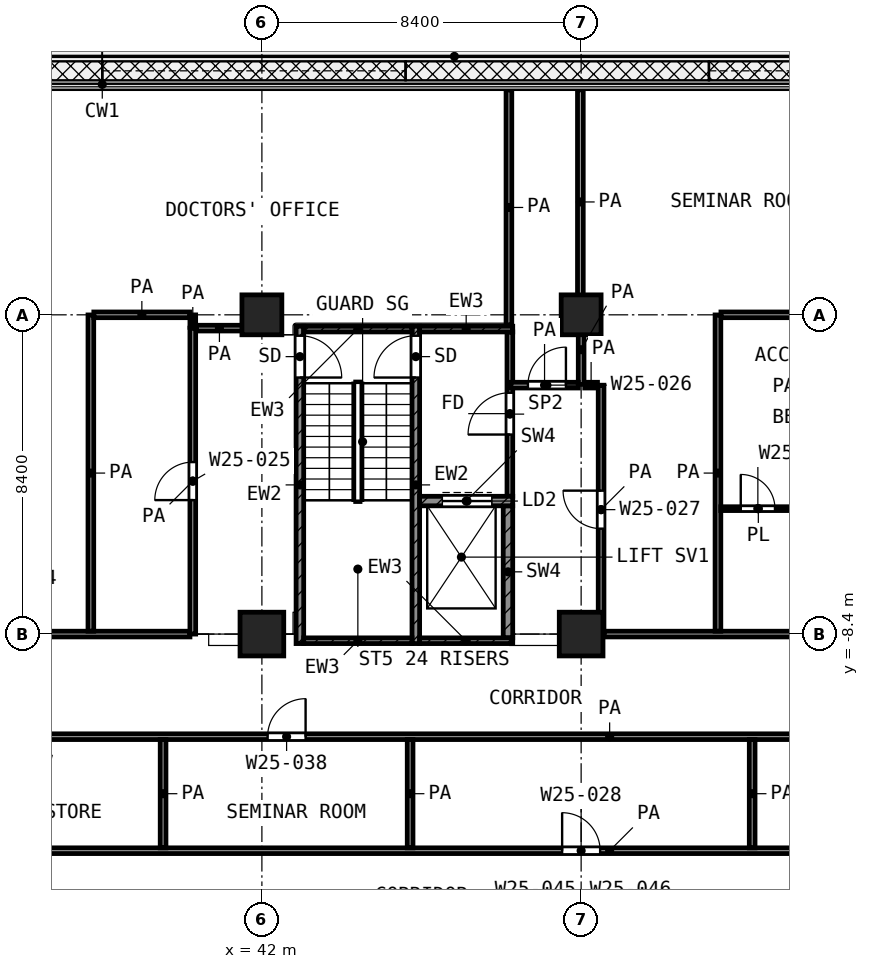
"""IFC4 building model, lengths in metres.
Left out: names, types, materials, properties, quantities, classifications, styles, units other than length and angle.
Written with IfcOpenShell. Run it as: python <this file> out.ifc"""

import sys

from ifc_helpers import new_model, si_unit, direction, frame, frame_2d, origin, origin_2d, place, context, subcontext, project, spatial, rectangle, extrude, element, fill, save


model = new_model("IFC4")
c1 = context("Model", 3, precision=1e-05, world=origin(), true_north=direction((0.0, 1.0)))
c2 = subcontext(c1, "Body", "Model", "MODEL_VIEW")
j1 = project(units=[si_unit("LENGTHUNIT", "METRE"), si_unit("PLANEANGLEUNIT", "RADIAN")], contexts=[c1])
p1 = place(None, origin())
s1 = spatial("IfcSite", under=j1, at=p1, CompositionType="ELEMENT")
p2 = place(p1, origin())
s2 = spatial("IfcBuilding", under=s1, at=p2, CompositionType="ELEMENT")
p3 = place(p2, frame((0.0, 0.0, 132.4)))
s3 = spatial("IfcBuildingStorey", under=s2, at=p3, CompositionType="ELEMENT", Elevation=132.4)
for number, where, z_axis, x_axis in (
    (1, (42.0, 0.0, 0.0), (0.0, 0.0, 1.0), (1.0, 0.0, 0.0)),
    (2, (50.4, 0.0, 0.0), (0.0, 0.0, 1.0), (1.0, 0.0, 0.0)),
):
    element("IfcColumn", number, at=place(p3, frame(where, z_axis=z_axis, x_axis=x_axis)), inside=s3, PredefinedType="COLUMN", context=c2, shape_type="SweptSolid", body=[
        extrude(rectangle(XDim=1.05, YDim=1.05, at=origin_2d()), origin(), (0.0, 0.0, 1.0), 4.2),
    ])
for number, where, z_axis, x_axis in (
    (3, (42.0, -8.4, 0.0), (0.0, 0.0, 1.0), (1.0, 0.0, 0.0)),
    (4, (50.4, -8.4, 0.0), (0.0, 0.0, 1.0), (1.0, 0.0, 0.0)),
):
    element("IfcColumn", number, at=place(p3, frame(where, z_axis=z_axis, x_axis=x_axis)), inside=s3, PredefinedType="COLUMN", context=c2, shape_type="SweptSolid", body=[
        extrude(rectangle(XDim=1.15, YDim=1.15, at=origin_2d()), origin(), (0.0, 0.0, 1.0), 4.2),
    ])
p4 = place(p3, frame((43.0, -8.65, 0.0), z_axis=(0.0, 0.0, 1.0), x_axis=(0.0, 1.0, 0.0)))
e5 = element("IfcWall", 5, at=p4, inside=s3, PredefinedType="SHEAR", context=c2, shape_type="SweptSolid", body=[
    extrude(rectangle(XDim=8.35, YDim=0.2, at=frame_2d((4.175, 0.0))), origin(), (0.0, 0.0, 1.0), 3.6),
])
p5 = place(p4, frame((7.0, 0.0, 0.0)))
e6 = element("IfcOpeningElement", 6, at=p5, cuts=e5, PredefinedType="OPENING", context=c2, shape_type="SweptSolid", body=[
    extrude(rectangle(XDim=1.1, YDim=2.1, at=frame_2d((0.55, 1.05))), frame((0.0, 0.11, 0.0), z_axis=(0.0, -1.0, 0.0), x_axis=(1.0, 0.0, 0.0)), (0.0, 0.0, 1.0), 0.22),
])
p6 = place(p3, frame((46.05, -8.65, 0.0), z_axis=(0.0, 0.0, 1.0), x_axis=(0.0, 1.0, 0.0)))
e7 = element("IfcWall", 7, at=p6, inside=s3, PredefinedType="SHEAR", context=c2, shape_type="SweptSolid", body=[
    extrude(rectangle(XDim=8.35, YDim=0.2, at=frame_2d((4.175, 0.0))), origin(), (0.0, 0.0, 1.0), 3.6),
])
p7 = place(p6, frame((7.0, 0.0, 0.0)))
e8 = element("IfcOpeningElement", 8, at=p7, cuts=e7, PredefinedType="OPENING", context=c2, shape_type="SweptSolid", body=[
    extrude(rectangle(XDim=1.1, YDim=2.1, at=frame_2d((0.55, 1.05))), frame((0.0, 0.11, 0.0), z_axis=(0.0, -1.0, 0.0), x_axis=(1.0, 0.0, 0.0)), (0.0, 0.0, 1.0), 0.22),
])
p8 = place(p3, frame((43.1, -0.375, 0.0), z_axis=(0.0, 0.0, 1.0), x_axis=(1.0, 0.0, 0.0)))
e9 = element("IfcWall", 9, at=p8, inside=s3, PredefinedType="SHEAR", context=c2, shape_type="SweptSolid", body=[
    extrude(rectangle(XDim=2.85, YDim=0.15, at=frame_2d((1.425, 0.0))), origin(), (0.0, 0.0, 1.0), 3.6),
])
p9 = place(p3, frame((46.15, -0.375, 0.0), z_axis=(0.0, 0.0, 1.0), x_axis=(1.0, 0.0, 0.0)))
e10 = element("IfcWall", 10, at=p9, inside=s3, PredefinedType="SHEAR", context=c2, shape_type="SweptSolid", body=[
    extrude(rectangle(XDim=2.45, YDim=0.15, at=frame_2d((1.225, 0.0))), origin(), (0.0, 0.0, 1.0), 3.6),
])
p10 = place(p3, frame((43.1, -8.575, 0.0), z_axis=(0.0, 0.0, 1.0), x_axis=(1.0, 0.0, 0.0)))
e11 = element("IfcWall", 11, at=p10, inside=s3, PredefinedType="SHEAR", context=c2, shape_type="SweptSolid", body=[
    extrude(rectangle(XDim=2.85, YDim=0.15, at=frame_2d((1.425, 0.0))), origin(), (0.0, 0.0, 1.0), 3.6),
])
p11 = place(p3, frame((46.15, -8.575, 0.0), z_axis=(0.0, 0.0, 1.0), x_axis=(1.0, 0.0, 0.0)))
e12 = element("IfcWall", 12, at=p11, inside=s3, PredefinedType="SHEAR", context=c2, shape_type="SweptSolid", body=[
    extrude(rectangle(XDim=2.45, YDim=0.15, at=frame_2d((1.225, 0.0))), origin(), (0.0, 0.0, 1.0), 3.6),
])
p12 = place(p3, frame((46.15, -4.9, 0.0), z_axis=(0.0, 0.0, 1.0), x_axis=(1.0, 0.0, 0.0)))
e13 = element("IfcWall", 13, at=p12, inside=s3, PredefinedType="SHEAR", context=c2, shape_type="SweptSolid", body=[
    extrude(rectangle(XDim=2.45, YDim=0.25, at=frame_2d((1.225, 0.0))), origin(), (0.0, 0.0, 1.0), 3.6),
])
p13 = place(p12, frame((0.6, 0.0, 0.0)))
e14 = element("IfcOpeningElement", 14, at=p13, cuts=e13, PredefinedType="OPENING", context=c2, shape_type="SweptSolid", body=[
    extrude(rectangle(XDim=1.3, YDim=2.1, at=frame_2d((0.65, 1.05))), frame((0.0, 0.135, 0.0), z_axis=(0.0, -1.0, 0.0), x_axis=(1.0, 0.0, 0.0)), (0.0, 0.0, 1.0), 0.27),
])
p14 = place(p3, frame((48.475, -8.5, 0.0), z_axis=(0.0, 0.0, 1.0), x_axis=(0.0, 1.0, 0.0)))
e15 = element("IfcWall", 15, at=p14, inside=s3, PredefinedType="SHEAR", context=c2, shape_type="SweptSolid", body=[
    extrude(rectangle(XDim=3.475, YDim=0.25, at=frame_2d((1.738, 0.0))), origin(), (0.0, 0.0, 1.0), 3.6),
])
p15 = place(p3, frame((48.525, -4.775, 0.0), z_axis=(0.0, 0.0, 1.0), x_axis=(0.0, 1.0, 0.0)))
e16 = element("IfcWall", 16, at=p15, inside=s3, PredefinedType="PARTITIONING", context=c2, shape_type="SweptSolid", body=[
    extrude(rectangle(XDim=4.325, YDim=0.15, at=frame_2d((2.163, 0.0))), origin(), (0.0, 0.0, 1.0), 3.6),
])
p16 = place(p15, frame((1.625, 0.0, 0.0)))
e17 = element("IfcOpeningElement", 17, at=p16, cuts=e16, PredefinedType="OPENING", context=c2, shape_type="SweptSolid", body=[
    extrude(rectangle(XDim=1.1, YDim=2.1, at=frame_2d((0.55, 1.05))), frame((0.0, 0.085, 0.0), z_axis=(0.0, -1.0, 0.0), x_axis=(1.0, 0.0, 0.0)), (0.0, 0.0, 1.0), 0.17),
])
p17 = place(p3, frame((54.075, -5.1, 0.0), z_axis=(0.0, 0.0, 1.0), x_axis=(1.0, 0.0, 0.0)))
e18 = element("IfcWall", 18, at=p17, inside=s3, PredefinedType="PARTITIONING", context=c2, shape_type="SweptSolid", body=[
    extrude(rectangle(XDim=1.975, YDim=0.1, at=frame_2d((0.988, 0.0))), origin(), (0.0, 0.0, 1.0), 3.6),
])
p18 = place(p17, frame((0.525, 0.0, 0.0)))
e19 = element("IfcOpeningElement", 19, at=p18, cuts=e18, PredefinedType="OPENING", context=c2, shape_type="SweptSolid", body=[
    extrude(rectangle(XDim=0.9, YDim=2.1, at=frame_2d((0.45, 1.05))), frame((0.0, 0.06, 0.0), z_axis=(0.0, -1.0, 0.0), x_axis=(1.0, 0.0, 0.0)), (0.0, 0.0, 1.0), 0.12),
])
p19 = place(p3, frame((29.475, -14.1, 0.0), z_axis=(0.0, 0.0, 1.0), x_axis=(1.0, 0.0, 0.0)))
e20 = element("IfcWall", 20, at=p19, inside=s3, PredefinedType="PARTITIONING", context=c2, shape_type="SweptSolid", body=[
    extrude(rectangle(XDim=43.35, YDim=0.15, at=frame_2d((21.675, 0.0))), origin(), (0.0, 0.0, 1.0), 3.6),
])
p20 = place(p19, frame((20.425, 0.0, 0.0)))
e21 = element("IfcOpeningElement", 21, at=p20, cuts=e20, PredefinedType="OPENING", context=c2, shape_type="SweptSolid", body=[
    extrude(rectangle(XDim=1.0, YDim=2.1, at=frame_2d((0.5, 1.05))), frame((0.0, 0.085, 0.0), z_axis=(0.0, -1.0, 0.0), x_axis=(1.0, 0.0, 0.0)), (0.0, 0.0, 1.0), 0.17),
])
p21 = place(p3, frame((29.475, -11.1, 0.0), z_axis=(0.0, 0.0, 1.0), x_axis=(1.0, 0.0, 0.0)))
e22 = element("IfcWall", 22, at=p21, inside=s3, PredefinedType="PARTITIONING", context=c2, shape_type="SweptSolid", body=[
    extrude(rectangle(XDim=43.35, YDim=0.15, at=frame_2d((21.675, 0.0))), origin(), (0.0, 0.0, 1.0), 3.6),
])
p22 = place(p21, frame((28.675, 0.0, 0.0)))
e23 = element("IfcOpeningElement", 23, at=p22, cuts=e22, PredefinedType="OPENING", context=c2, shape_type="SweptSolid", body=[
    extrude(rectangle(XDim=1.0, YDim=2.1, at=frame_2d((0.5, 1.05))), frame((0.0, 0.085, 0.0), z_axis=(0.0, -1.0, 0.0), x_axis=(1.0, 0.0, 0.0)), (0.0, 0.0, 1.0), 0.17),
])
p23 = place(p21, frame((34.875, 0.0, 0.0)))
e24 = element("IfcOpeningElement", 24, at=p23, cuts=e22, PredefinedType="OPENING", context=c2, shape_type="SweptSolid", body=[
    extrude(rectangle(XDim=0.9, YDim=2.1, at=frame_2d((0.45, 1.05))), frame((0.0, 0.085, 0.0), z_axis=(0.0, -1.0, 0.0), x_axis=(1.0, 0.0, 0.0)), (0.0, 0.0, 1.0), 0.17),
])
p24 = place(p21, frame((40.075, 0.0, 0.0)))
e25 = element("IfcOpeningElement", 25, at=p24, cuts=e22, PredefinedType="OPENING", context=c2, shape_type="SweptSolid", body=[
    extrude(rectangle(XDim=1.0, YDim=2.1, at=frame_2d((0.5, 1.05))), frame((0.0, 0.085, 0.0), z_axis=(0.0, -1.0, 0.0), x_axis=(1.0, 0.0, 0.0)), (0.0, 0.0, 1.0), 0.17),
])
p25 = place(p21, frame((5.475, 0.0, 0.0)))
e26 = element("IfcOpeningElement", 26, at=p25, cuts=e22, PredefinedType="OPENING", context=c2, shape_type="SweptSolid", body=[
    extrude(rectangle(XDim=1.0, YDim=2.1, at=frame_2d((0.5, 1.05))), frame((0.0, 0.085, 0.0), z_axis=(0.0, -1.0, 0.0), x_axis=(1.0, 0.0, 0.0)), (0.0, 0.0, 1.0), 0.17),
])
p26 = place(p21, frame((12.675, 0.0, 0.0)))
e27 = element("IfcOpeningElement", 27, at=p26, cuts=e22, PredefinedType="OPENING", context=c2, shape_type="SweptSolid", body=[
    extrude(rectangle(XDim=1.0, YDim=2.1, at=frame_2d((0.5, 1.05))), frame((0.0, 0.085, 0.0), z_axis=(0.0, -1.0, 0.0), x_axis=(1.0, 0.0, 0.0)), (0.0, 0.0, 1.0), 0.17),
])
p27 = place(p3, frame((25.0, -8.4, 0.0), z_axis=(0.0, 0.0, 1.0), x_axis=(1.0, 0.0, 0.0)))
e28 = element("IfcWall", 28, at=p27, inside=s3, PredefinedType="PARTITIONING", context=c2, shape_type="SweptSolid", body=[
    extrude(rectangle(XDim=15.107, YDim=0.15, at=frame_2d((7.553, 0.0))), origin(), (0.0, 0.0, 1.0), 3.6),
])
p28 = place(p27, frame((3.8, 0.0, 0.0)))
e29 = element("IfcOpeningElement", 29, at=p28, cuts=e28, PredefinedType="OPENING", context=c2, shape_type="SweptSolid", body=[
    extrude(rectangle(XDim=1.2, YDim=2.1, at=frame_2d((0.6, 1.05))), frame((0.0, 0.085, 0.0), z_axis=(0.0, -1.0, 0.0), x_axis=(1.0, 0.0, 0.0)), (0.0, 0.0, 1.0), 0.17),
])
p29 = place(p27, frame((10.05, 0.0, 0.0)))
e30 = element("IfcOpeningElement", 30, at=p29, cuts=e28, PredefinedType="OPENING", context=c2, shape_type="SweptSolid", body=[
    extrude(rectangle(XDim=1.0, YDim=2.1, at=frame_2d((0.5, 1.05))), frame((0.0, 0.085, 0.0), z_axis=(0.0, -1.0, 0.0), x_axis=(1.0, 0.0, 0.0)), (0.0, 0.0, 1.0), 0.17),
])
p30 = place(p3, frame((51.0, -8.4, 0.0), z_axis=(0.0, 0.0, 1.0), x_axis=(1.0, 0.0, 0.0)))
e31 = element("IfcWall", 31, at=p30, inside=s3, PredefinedType="PARTITIONING", context=c2, shape_type="SweptSolid", body=[
    extrude(rectangle(XDim=24.52, YDim=0.15, at=frame_2d((12.26, 0.0))), origin(), (0.0, 0.0, 1.0), 3.6),
])
p31 = place(p30, frame((5.4, 0.0, 0.0)))
e32 = element("IfcOpeningElement", 32, at=p31, cuts=e31, PredefinedType="OPENING", context=c2, shape_type="SweptSolid", body=[
    extrude(rectangle(XDim=1.2, YDim=2.1, at=frame_2d((0.6, 1.05))), frame((0.0, 0.085, 0.0), z_axis=(0.0, -1.0, 0.0), x_axis=(1.0, 0.0, 0.0)), (0.0, 0.0, 1.0), 0.17),
])
p32 = place(p30, frame((8.4, 0.0, 0.0)))
e33 = element("IfcOpeningElement", 33, at=p32, cuts=e31, PredefinedType="OPENING", context=c2, shape_type="SweptSolid", body=[
    extrude(rectangle(XDim=1.2, YDim=2.1, at=frame_2d((0.6, 1.05))), frame((0.0, 0.085, 0.0), z_axis=(0.0, -1.0, 0.0), x_axis=(1.0, 0.0, 0.0)), (0.0, 0.0, 1.0), 0.17),
])
p33 = place(p30, frame((14.3, 0.0, 0.0)))
e34 = element("IfcOpeningElement", 34, at=p33, cuts=e31, PredefinedType="OPENING", context=c2, shape_type="SweptSolid", body=[
    extrude(rectangle(XDim=1.2, YDim=2.1, at=frame_2d((0.6, 1.05))), frame((0.0, 0.085, 0.0), z_axis=(0.0, -1.0, 0.0), x_axis=(1.0, 0.0, 0.0)), (0.0, 0.0, 1.0), 0.17),
])
p34 = place(p30, frame((19.65, 0.0, 0.0)))
e35 = element("IfcOpeningElement", 35, at=p34, cuts=e31, PredefinedType="OPENING", context=c2, shape_type="SweptSolid", body=[
    extrude(rectangle(XDim=1.5, YDim=2.1, at=frame_2d((0.75, 1.05))), frame((0.0, 0.085, 0.0), z_axis=(0.0, -1.0, 0.0), x_axis=(1.0, 0.0, 0.0)), (0.0, 0.0, 1.0), 0.17),
])
p35 = place(p3, frame((48.55, -1.85, 0.0), z_axis=(0.0, 0.0, 1.0), x_axis=(1.0, 0.0, 0.0)))
e36 = element("IfcWall", 36, at=p35, inside=s3, PredefinedType="PARTITIONING", context=c2, shape_type="SweptSolid", body=[
    extrude(rectangle(XDim=1.775, YDim=0.15, at=frame_2d((0.887, 0.0))), origin(), (0.0, 0.0, 1.0), 3.6),
])
p36 = place(p35, frame((0.45, 0.0, 0.0)))
e37 = element("IfcOpeningElement", 37, at=p36, cuts=e36, PredefinedType="OPENING", context=c2, shape_type="SweptSolid", body=[
    extrude(rectangle(XDim=1.0, YDim=2.1, at=frame_2d((0.5, 1.05))), frame((0.0, 0.085, 0.0), z_axis=(0.0, -1.0, 0.0), x_axis=(1.0, 0.0, 0.0)), (0.0, 0.0, 1.0), 0.17),
])
p37 = place(p3, frame((50.495, -1.85, 0.0), z_axis=(0.0, 0.0, 1.0), x_axis=(1.0, 0.0, 0.0)))
e38 = element("IfcWall", 38, at=p37, inside=s3, PredefinedType="PARTITIONING", context=c2, shape_type="SweptSolid", body=[
    extrude(rectangle(XDim=0.335, YDim=0.15, at=frame_2d((0.167, 0.0))), origin(), (0.0, 0.0, 1.0), 3.6),
])
p38 = place(p3, frame((40.277, -0.35, 0.0), z_axis=(0.0, 0.0, 1.0), x_axis=(1.0, 0.0, 0.0)))
e39 = element("IfcWall", 39, at=p38, inside=s3, PredefinedType="PARTITIONING", context=c2, shape_type="SweptSolid", body=[
    extrude(rectangle(XDim=1.211, YDim=0.15, at=frame_2d((0.605, 0.0))), origin(), (0.0, 0.0, 1.0), 3.6),
])
p39 = place(p3, frame((37.578, 0.0, 0.0), z_axis=(0.0, 0.0, 1.0), x_axis=(1.0, 0.0, 0.0)))
e40 = element("IfcWall", 40, at=p39, inside=s3, PredefinedType="PARTITIONING", context=c2, shape_type="SweptSolid", body=[
    extrude(rectangle(XDim=2.527, YDim=0.15, at=frame_2d((1.264, 0.0))), origin(), (0.0, 0.0, 1.0), 3.6),
])
p40 = place(p3, frame((54.079, 0.0, 0.0), z_axis=(0.0, 0.0, 1.0), x_axis=(1.0, 0.0, 0.0)))
e41 = element("IfcWall", 41, at=p40, inside=s3, PredefinedType="PARTITIONING", context=c2, shape_type="SweptSolid", body=[
    extrude(rectangle(XDim=8.846, YDim=0.15, at=frame_2d((4.423, 0.0))), origin(), (0.0, 0.0, 1.0), 3.6),
])
p41 = place(p3, frame((37.5, -8.325, 0.0), z_axis=(0.0, 0.0, 1.0), x_axis=(0.0, 1.0, 0.0)))
e42 = element("IfcWall", 42, at=p41, inside=s3, PredefinedType="PARTITIONING", context=c2, shape_type="SweptSolid", body=[
    extrude(rectangle(XDim=8.322, YDim=0.15, at=frame_2d((4.161, 0.0))), origin(), (0.0, 0.0, 1.0), 3.6),
])
p42 = place(p3, frame((39.4, -14.025, 0.0), z_axis=(0.0, 0.0, 1.0), x_axis=(0.0, 1.0, 0.0)))
e43 = element("IfcWall", 43, at=p42, inside=s3, PredefinedType="PARTITIONING", context=c2, shape_type="SweptSolid", body=[
    extrude(rectangle(XDim=2.85, YDim=0.15, at=frame_2d((1.425, 0.0))), origin(), (0.0, 0.0, 1.0), 3.6),
])
p43 = place(p3, frame((40.182, -8.4, 0.0), z_axis=(0.0, 0.0, 1.0), x_axis=(0.0, 1.0, 0.0)))
e44 = element("IfcWall", 44, at=p43, inside=s3, PredefinedType="PARTITIONING", context=c2, shape_type="SweptSolid", body=[
    extrude(rectangle(XDim=8.05, YDim=0.15, at=frame_2d((4.025, 0.0))), origin(), (0.0, 0.0, 1.0), 3.6),
])
p44 = place(p43, frame((3.525, 0.0, 0.0)))
e45 = element("IfcOpeningElement", 45, at=p44, cuts=e44, PredefinedType="OPENING", context=c2, shape_type="SweptSolid", body=[
    extrude(rectangle(XDim=1.0, YDim=2.1, at=frame_2d((0.5, 1.05))), frame((0.0, 0.085, 0.0), z_axis=(0.0, -1.0, 0.0), x_axis=(1.0, 0.0, 0.0)), (0.0, 0.0, 1.0), 0.17),
])
p45 = place(p3, frame((40.182, -0.33, 0.0), z_axis=(0.0, 0.0, 1.0), x_axis=(0.0, 1.0, 0.0)))
e46 = element("IfcWall", 46, at=p45, inside=s3, PredefinedType="PARTITIONING", context=c2, shape_type="SweptSolid", body=[
    extrude(rectangle(XDim=0.328, YDim=0.15, at=frame_2d((0.164, 0.0))), origin(), (0.0, 0.0, 1.0), 3.6),
])
p46 = place(p3, frame((45.9, -14.025, 0.0), z_axis=(0.0, 0.0, 1.0), x_axis=(0.0, 1.0, 0.0)))
e47 = element("IfcWall", 47, at=p46, inside=s3, PredefinedType="PARTITIONING", context=c2, shape_type="SweptSolid", body=[
    extrude(rectangle(XDim=2.85, YDim=0.15, at=frame_2d((1.425, 0.0))), origin(), (0.0, 0.0, 1.0), 3.6),
])
p47 = place(p3, frame((48.5, -0.27, 0.0), z_axis=(0.0, 0.0, 1.0), x_axis=(0.0, 1.0, 0.0)))
e48 = element("IfcWall", 48, at=p47, inside=s3, PredefinedType="PARTITIONING", context=c2, shape_type="SweptSolid", body=[
    extrude(rectangle(XDim=6.19, YDim=0.15, at=frame_2d((3.095, 0.0))), origin(), (0.0, 0.0, 1.0), 3.6),
])
p48 = place(p3, frame((50.38, 0.02, 0.0), z_axis=(0.0, 0.0, 1.0), x_axis=(0.0, 1.0, 0.0)))
e49 = element("IfcWall", 49, at=p48, inside=s3, PredefinedType="PARTITIONING", context=c2, shape_type="SweptSolid", body=[
    extrude(rectangle(XDim=5.9, YDim=0.15, at=frame_2d((2.95, 0.0))), origin(), (0.0, 0.0, 1.0), 3.6),
])
p49 = place(p3, frame((50.4, -1.83, 0.0), z_axis=(0.0, 0.0, 1.0), x_axis=(0.0, 1.0, 0.0)))
e50 = element("IfcWall", 50, at=p49, inside=s3, PredefinedType="PARTITIONING", context=c2, shape_type="SweptSolid", body=[
    extrude(rectangle(XDim=1.825, YDim=0.15, at=frame_2d((0.913, 0.0))), origin(), (0.0, 0.0, 1.0), 3.6),
])
p50 = place(p3, frame((50.925, -8.4, 0.0), z_axis=(0.0, 0.0, 1.0), x_axis=(0.0, 1.0, 0.0)))
e51 = element("IfcWall", 51, at=p50, inside=s3, PredefinedType="PARTITIONING", context=c2, shape_type="SweptSolid", body=[
    extrude(rectangle(XDim=6.548, YDim=0.15, at=frame_2d((3.274, 0.0))), origin(), (0.0, 0.0, 1.0), 3.6),
])
p51 = place(p50, frame((2.774, 0.0, 0.0)))
e52 = element("IfcOpeningElement", 52, at=p51, cuts=e51, PredefinedType="OPENING", context=c2, shape_type="SweptSolid", body=[
    extrude(rectangle(XDim=1.0, YDim=2.1, at=frame_2d((0.5, 1.05))), frame((0.0, 0.085, 0.0), z_axis=(0.0, -1.0, 0.0), x_axis=(1.0, 0.0, 0.0)), (0.0, 0.0, 1.0), 0.17),
])
p52 = place(p3, frame((54.0, -8.325, 0.0), z_axis=(0.0, 0.0, 1.0), x_axis=(0.0, 1.0, 0.0)))
e53 = element("IfcWall", 53, at=p52, inside=s3, PredefinedType="PARTITIONING", context=c2, shape_type="SweptSolid", body=[
    extrude(rectangle(XDim=8.322, YDim=0.15, at=frame_2d((4.161, 0.0))), origin(), (0.0, 0.0, 1.0), 3.6),
])
p53 = place(p3, frame((54.9, -14.025, 0.0), z_axis=(0.0, 0.0, 1.0), x_axis=(0.0, 1.0, 0.0)))
e54 = element("IfcWall", 54, at=p53, inside=s3, PredefinedType="PARTITIONING", context=c2, shape_type="SweptSolid", body=[
    extrude(rectangle(XDim=2.85, YDim=0.15, at=frame_2d((1.425, 0.0))), origin(), (0.0, 0.0, 1.0), 3.6),
])
p54 = place(p5, frame((1.1, 0.0, 0.0), z_axis=(0.0, 0.0, 1.0), x_axis=(-1.0, 0.0, 0.0)))
e55 = element("IfcDoor", 55, at=p54, inside=s3, OperationType="SINGLE_SWING_LEFT", PredefinedType="DOOR", context=c2, shape_type="SweptSolid", body=[
    extrude(rectangle(XDim=1.1, YDim=2.1, at=frame_2d((0.55, 1.05))), frame((0.0, 0.025, 0.0), z_axis=(0.0, -1.0, 0.0), x_axis=(1.0, 0.0, 0.0)), (0.0, 0.0, 1.0), 0.05),
])
fill(e6, e55)
p55 = place(p7, origin())
e56 = element("IfcDoor", 56, at=p55, inside=s3, OperationType="SINGLE_SWING_LEFT", PredefinedType="DOOR", context=c2, shape_type="SweptSolid", body=[
    extrude(rectangle(XDim=1.1, YDim=2.1, at=frame_2d((0.55, 1.05))), frame((0.0, 0.025, 0.0), z_axis=(0.0, -1.0, 0.0), x_axis=(1.0, 0.0, 0.0)), (0.0, 0.0, 1.0), 0.05),
])
fill(e8, e56)
p56 = place(p13, origin())
e57 = element("IfcDoor", 57, at=p56, inside=s3, OperationType="DOUBLE_DOOR_SLIDING", PredefinedType="DOOR", context=c2, shape_type="SweptSolid", body=[
    extrude(rectangle(XDim=1.3, YDim=2.1, at=frame_2d((0.65, 1.05))), frame((0.0, 0.025, 0.0), z_axis=(0.0, -1.0, 0.0), x_axis=(1.0, 0.0, 0.0)), (0.0, 0.0, 1.0), 0.05),
])
fill(e14, e57)
p57 = place(p16, origin())
e58 = element("IfcDoor", 58, at=p57, inside=s3, OperationType="SINGLE_SWING_LEFT", PredefinedType="DOOR", context=c2, shape_type="SweptSolid", body=[
    extrude(rectangle(XDim=1.1, YDim=2.1, at=frame_2d((0.55, 1.05))), frame((0.0, 0.025, 0.0), z_axis=(0.0, -1.0, 0.0), x_axis=(1.0, 0.0, 0.0)), (0.0, 0.0, 1.0), 0.05),
])
fill(e17, e58)
p58 = place(p44, origin())
e59 = element("IfcDoor", 59, at=p58, inside=s3, OperationType="SINGLE_SWING_LEFT", PredefinedType="DOOR", context=c2, shape_type="SweptSolid", body=[
    extrude(rectangle(XDim=1.0, YDim=2.1, at=frame_2d((0.5, 1.05))), frame((0.0, 0.025, 0.0), z_axis=(0.0, -1.0, 0.0), x_axis=(1.0, 0.0, 0.0)), (0.0, 0.0, 1.0), 0.05),
])
fill(e45, e59)
p59 = place(p36, origin())
e60 = element("IfcDoor", 60, at=p59, inside=s3, OperationType="SINGLE_SWING_RIGHT", PredefinedType="DOOR", context=c2, shape_type="SweptSolid", body=[
    extrude(rectangle(XDim=1.0, YDim=2.1, at=frame_2d((0.5, 1.05))), frame((0.0, 0.025, 0.0), z_axis=(0.0, -1.0, 0.0), x_axis=(1.0, 0.0, 0.0)), (0.0, 0.0, 1.0), 0.05),
])
fill(e37, e60)
p60 = place(p51, origin())
e61 = element("IfcDoor", 61, at=p60, inside=s3, OperationType="SINGLE_SWING_RIGHT", PredefinedType="DOOR", context=c2, shape_type="SweptSolid", body=[
    extrude(rectangle(XDim=1.0, YDim=2.1, at=frame_2d((0.5, 1.05))), frame((0.0, 0.025, 0.0), z_axis=(0.0, -1.0, 0.0), x_axis=(1.0, 0.0, 0.0)), (0.0, 0.0, 1.0), 0.05),
])
fill(e52, e61)
p61 = place(p18, origin())
e62 = element("IfcDoor", 62, at=p61, inside=s3, OperationType="SINGLE_SWING_LEFT", PredefinedType="DOOR", context=c2, shape_type="SweptSolid", body=[
    extrude(rectangle(XDim=0.9, YDim=2.1, at=frame_2d((0.45, 1.05))), frame((0.0, 0.025, 0.0), z_axis=(0.0, -1.0, 0.0), x_axis=(1.0, 0.0, 0.0)), (0.0, 0.0, 1.0), 0.05),
])
fill(e19, e62)
p62 = place(p20, origin())
e63 = element("IfcDoor", 63, at=p62, inside=s3, OperationType="SINGLE_SWING_LEFT", PredefinedType="DOOR", context=c2, shape_type="SweptSolid", body=[
    extrude(rectangle(XDim=1.0, YDim=2.1, at=frame_2d((0.5, 1.05))), frame((0.0, 0.025, 0.0), z_axis=(0.0, -1.0, 0.0), x_axis=(1.0, 0.0, 0.0)), (0.0, 0.0, 1.0), 0.05),
])
fill(e21, e63)
p63 = place(p26, origin())
e64 = element("IfcDoor", 64, at=p63, inside=s3, OperationType="SINGLE_SWING_RIGHT", PredefinedType="DOOR", context=c2, shape_type="SweptSolid", body=[
    extrude(rectangle(XDim=1.0, YDim=2.1, at=frame_2d((0.5, 1.05))), frame((0.0, 0.025, 0.0), z_axis=(0.0, -1.0, 0.0), x_axis=(1.0, 0.0, 0.0)), (0.0, 0.0, 1.0), 0.05),
])
fill(e27, e64)
save(model, sys.argv[1])
